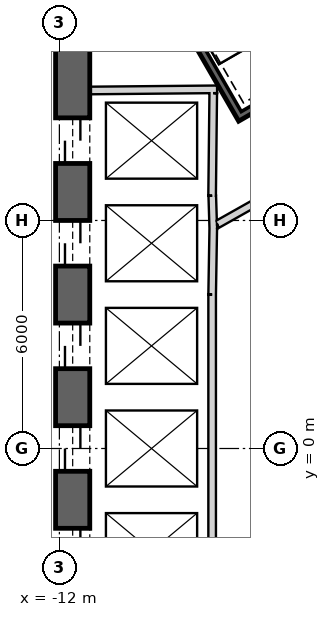
"""IFC4 building model, lengths in metres.
Left out: names, types, materials, properties, quantities, classifications, styles, units other than length and angle.
Written with IfcOpenShell. Run it as: python <this file> out.ifc"""

import sys

from ifc_helpers import new_model, si_unit, direction, frame, frame_2d, origin, place, context, subcontext, project, spatial, rectangle, extrude, element, fill, save


model = new_model("IFC4")
c1 = context("Model", 3, precision=1e-05, world=origin(), true_north=direction((0.0, 1.0)))
c2 = subcontext(c1, "Body", "Model", "MODEL_VIEW")
j1 = project(units=[si_unit("LENGTHUNIT", "METRE"), si_unit("PLANEANGLEUNIT", "RADIAN")], contexts=[c1])
p1 = place(None, origin())
s1 = spatial("IfcSite", under=j1, at=p1, CompositionType="ELEMENT")
p2 = place(p1, origin())
s2 = spatial("IfcBuilding", under=s1, at=p2, CompositionType="ELEMENT")
p3 = place(p2, frame((0.0, 0.0, 21.5)))
s3 = spatial("IfcBuildingStorey", under=s2, at=p3, CompositionType="ELEMENT", Elevation=21.5)
p4 = place(p3, frame((19.475, 2.208, 0.0), z_axis=(0.0, 0.0, 1.0), x_axis=(-0.866028369851, 0.499994862586, 0.0)))
e1 = element("IfcWall", 1, at=p4, inside=s3, PredefinedType="SHEAR", context=c2, shape_type="SweptSolid", body=[
    extrude(rectangle(XDim=31.523, YDim=0.9, at=frame_2d((15.762, 0.0))), origin(), (0.0, 0.0, 1.0), 6.0),
])
p5 = place(p4, frame((7.062, 0.0, 0.0)))
e2 = element("IfcOpeningElement", 2, at=p5, cuts=e1, PredefinedType="OPENING", context=c2, shape_type="SweptSolid", body=[
    extrude(rectangle(XDim=1.2, YDim=2.4, at=frame_2d((0.6, 1.2))), frame((0.0, 0.46, 0.0), z_axis=(0.0, -1.0, 0.0), x_axis=(1.0, 0.0, 0.0)), (0.0, 0.0, 1.0), 0.92),
])
p6 = place(p4, frame((9.762, 0.0, 0.0)))
e3 = element("IfcOpeningElement", 3, at=p6, cuts=e1, PredefinedType="OPENING", context=c2, shape_type="SweptSolid", body=[
    extrude(rectangle(XDim=1.2, YDim=2.4, at=frame_2d((0.6, 1.2))), frame((0.0, 0.46, 0.0), z_axis=(0.0, -1.0, 0.0), x_axis=(1.0, 0.0, 0.0)), (0.0, 0.0, 1.0), 0.92),
])
p7 = place(p4, frame((12.462, 0.0, 0.0)))
e4 = element("IfcOpeningElement", 4, at=p7, cuts=e1, PredefinedType="OPENING", context=c2, shape_type="SweptSolid", body=[
    extrude(rectangle(XDim=1.2, YDim=2.4, at=frame_2d((0.6, 1.2))), frame((0.0, 0.46, 0.0), z_axis=(0.0, -1.0, 0.0), x_axis=(1.0, 0.0, 0.0)), (0.0, 0.0, 1.0), 0.92),
])
p8 = place(p4, frame((15.162, 0.0, 0.0)))
e5 = element("IfcOpeningElement", 5, at=p8, cuts=e1, PredefinedType="OPENING", context=c2, shape_type="SweptSolid", body=[
    extrude(rectangle(XDim=1.2, YDim=2.4, at=frame_2d((0.6, 1.2))), frame((0.0, 0.46, 0.0), z_axis=(0.0, -1.0, 0.0), x_axis=(1.0, 0.0, 0.0)), (0.0, 0.0, 1.0), 0.92),
])
p9 = place(p4, frame((17.862, 0.0, 0.0)))
e6 = element("IfcOpeningElement", 6, at=p9, cuts=e1, PredefinedType="OPENING", context=c2, shape_type="SweptSolid", body=[
    extrude(rectangle(XDim=1.2, YDim=2.4, at=frame_2d((0.6, 1.2))), frame((0.0, 0.46, 0.0), z_axis=(0.0, -1.0, 0.0), x_axis=(1.0, 0.0, 0.0)), (0.0, 0.0, 1.0), 0.92),
])
p10 = place(p4, frame((20.562, 0.0, 0.0)))
e7 = element("IfcOpeningElement", 7, at=p10, cuts=e1, PredefinedType="OPENING", context=c2, shape_type="SweptSolid", body=[
    extrude(rectangle(XDim=1.2, YDim=2.4, at=frame_2d((0.6, 1.2))), frame((0.0, 0.46, 0.0), z_axis=(0.0, -1.0, 0.0), x_axis=(1.0, 0.0, 0.0)), (0.0, 0.0, 1.0), 0.92),
])
p11 = place(p4, frame((23.262, 0.0, 0.0)))
e8 = element("IfcOpeningElement", 8, at=p11, cuts=e1, PredefinedType="OPENING", context=c2, shape_type="SweptSolid", body=[
    extrude(rectangle(XDim=1.2, YDim=2.4, at=frame_2d((0.6, 1.2))), frame((0.0, 0.46, 0.0), z_axis=(0.0, -1.0, 0.0), x_axis=(1.0, 0.0, 0.0)), (0.0, 0.0, 1.0), 0.92),
])
p12 = place(p4, frame((3.612, 0.0, 0.0)))
e9 = element("IfcOpeningElement", 9, at=p12, cuts=e1, PredefinedType="OPENING", context=c2, shape_type="SweptSolid", body=[
    extrude(rectangle(XDim=1.2, YDim=2.4, at=frame_2d((0.6, 1.2))), frame((0.0, 0.46, 0.0), z_axis=(0.0, -1.0, 0.0), x_axis=(1.0, 0.0, 0.0)), (0.0, 0.0, 1.0), 0.92),
])
p13 = place(p4, frame((26.712, 0.0, 0.0)))
e10 = element("IfcOpeningElement", 10, at=p13, cuts=e1, PredefinedType="OPENING", context=c2, shape_type="SweptSolid", body=[
    extrude(rectangle(XDim=1.2, YDim=2.4, at=frame_2d((0.6, 1.2))), frame((0.0, 0.46, 0.0), z_axis=(0.0, -1.0, 0.0), x_axis=(1.0, 0.0, 0.0)), (0.0, 0.0, 1.0), 0.92),
])
p14 = place(p3, frame((-11.65, 15.762, 0.0), z_axis=(0.0, 0.0, 1.0), x_axis=(0.0, -1.0, 0.0)))
e11 = element("IfcWall", 11, at=p14, inside=s3, PredefinedType="SHEAR", context=c2, shape_type="SweptSolid", body=[
    extrude(rectangle(XDim=31.523, YDim=0.9, at=frame_2d((15.762, 0.0))), origin(), (0.0, 0.0, 1.0), 6.0),
])
p15 = place(p14, frame((7.062, 0.0, 0.0)))
e12 = element("IfcOpeningElement", 12, at=p15, cuts=e11, PredefinedType="OPENING", context=c2, shape_type="SweptSolid", body=[
    extrude(rectangle(XDim=1.2, YDim=2.4, at=frame_2d((0.6, 1.2))), frame((0.0, 0.46, 0.0), z_axis=(0.0, -1.0, 0.0), x_axis=(1.0, 0.0, 0.0)), (0.0, 0.0, 1.0), 0.92),
])
p16 = place(p14, frame((9.762, 0.0, 0.0)))
e13 = element("IfcOpeningElement", 13, at=p16, cuts=e11, PredefinedType="OPENING", context=c2, shape_type="SweptSolid", body=[
    extrude(rectangle(XDim=1.2, YDim=2.4, at=frame_2d((0.6, 1.2))), frame((0.0, 0.46, 0.0), z_axis=(0.0, -1.0, 0.0), x_axis=(1.0, 0.0, 0.0)), (0.0, 0.0, 1.0), 0.92),
])
p17 = place(p14, frame((12.462, 0.0, 0.0)))
e14 = element("IfcOpeningElement", 14, at=p17, cuts=e11, PredefinedType="OPENING", context=c2, shape_type="SweptSolid", body=[
    extrude(rectangle(XDim=1.2, YDim=2.4, at=frame_2d((0.6, 1.2))), frame((0.0, 0.46, 0.0), z_axis=(0.0, -1.0, 0.0), x_axis=(1.0, 0.0, 0.0)), (0.0, 0.0, 1.0), 0.92),
])
p18 = place(p14, frame((15.162, 0.0, 0.0)))
e15 = element("IfcOpeningElement", 15, at=p18, cuts=e11, PredefinedType="OPENING", context=c2, shape_type="SweptSolid", body=[
    extrude(rectangle(XDim=1.2, YDim=2.4, at=frame_2d((0.6, 1.2))), frame((0.0, 0.46, 0.0), z_axis=(0.0, -1.0, 0.0), x_axis=(1.0, 0.0, 0.0)), (0.0, 0.0, 1.0), 0.92),
])
p19 = place(p14, frame((17.862, 0.0, 0.0)))
e16 = element("IfcOpeningElement", 16, at=p19, cuts=e11, PredefinedType="OPENING", context=c2, shape_type="SweptSolid", body=[
    extrude(rectangle(XDim=1.2, YDim=2.4, at=frame_2d((0.6, 1.2))), frame((0.0, 0.46, 0.0), z_axis=(0.0, -1.0, 0.0), x_axis=(1.0, 0.0, 0.0)), (0.0, 0.0, 1.0), 0.92),
])
p20 = place(p14, frame((20.562, 0.0, 0.0)))
e17 = element("IfcOpeningElement", 17, at=p20, cuts=e11, PredefinedType="OPENING", context=c2, shape_type="SweptSolid", body=[
    extrude(rectangle(XDim=1.2, YDim=2.4, at=frame_2d((0.6, 1.2))), frame((0.0, 0.46, 0.0), z_axis=(0.0, -1.0, 0.0), x_axis=(1.0, 0.0, 0.0)), (0.0, 0.0, 1.0), 0.92),
])
p21 = place(p14, frame((23.262, 0.0, 0.0)))
e18 = element("IfcOpeningElement", 18, at=p21, cuts=e11, PredefinedType="OPENING", context=c2, shape_type="SweptSolid", body=[
    extrude(rectangle(XDim=1.2, YDim=2.4, at=frame_2d((0.6, 1.2))), frame((0.0, 0.46, 0.0), z_axis=(0.0, -1.0, 0.0), x_axis=(1.0, 0.0, 0.0)), (0.0, 0.0, 1.0), 0.92),
])
p22 = place(p14, frame((3.612, 0.0, 0.0)))
e19 = element("IfcOpeningElement", 19, at=p22, cuts=e11, PredefinedType="OPENING", context=c2, shape_type="SweptSolid", body=[
    extrude(rectangle(XDim=1.2, YDim=2.4, at=frame_2d((0.6, 1.2))), frame((0.0, 0.46, 0.0), z_axis=(0.0, -1.0, 0.0), x_axis=(1.0, 0.0, 0.0)), (0.0, 0.0, 1.0), 0.92),
])
p23 = place(p14, frame((26.712, 0.0, 0.0)))
e20 = element("IfcOpeningElement", 20, at=p23, cuts=e11, PredefinedType="OPENING", context=c2, shape_type="SweptSolid", body=[
    extrude(rectangle(XDim=1.2, YDim=2.4, at=frame_2d((0.6, 1.2))), frame((0.0, 0.46, 0.0), z_axis=(0.0, -1.0, 0.0), x_axis=(1.0, 0.0, 0.0)), (0.0, 0.0, 1.0), 0.92),
])
p24 = place(p3, frame((-7.825, -17.97, 0.0), z_axis=(0.0, 0.0, 1.0), x_axis=(0.866028369851, 0.499994862586, 0.0)))
e21 = element("IfcWall", 21, at=p24, inside=s3, PredefinedType="SHEAR", context=c2, shape_type="SweptSolid", body=[
    extrude(rectangle(XDim=31.523, YDim=0.9, at=frame_2d((15.762, 0.0))), origin(), (0.0, 0.0, 1.0), 6.0),
])
p25 = place(p24, frame((7.062, 0.0, 0.0)))
e22 = element("IfcOpeningElement", 22, at=p25, cuts=e21, PredefinedType="OPENING", context=c2, shape_type="SweptSolid", body=[
    extrude(rectangle(XDim=1.2, YDim=2.4, at=frame_2d((0.6, 1.2))), frame((0.0, 0.46, 0.0), z_axis=(0.0, -1.0, 0.0), x_axis=(1.0, 0.0, 0.0)), (0.0, 0.0, 1.0), 0.92),
])
p26 = place(p24, frame((9.762, 0.0, 0.0)))
e23 = element("IfcOpeningElement", 23, at=p26, cuts=e21, PredefinedType="OPENING", context=c2, shape_type="SweptSolid", body=[
    extrude(rectangle(XDim=1.2, YDim=2.4, at=frame_2d((0.6, 1.2))), frame((0.0, 0.46, 0.0), z_axis=(0.0, -1.0, 0.0), x_axis=(1.0, 0.0, 0.0)), (0.0, 0.0, 1.0), 0.92),
])
p27 = place(p24, frame((12.462, 0.0, 0.0)))
e24 = element("IfcOpeningElement", 24, at=p27, cuts=e21, PredefinedType="OPENING", context=c2, shape_type="SweptSolid", body=[
    extrude(rectangle(XDim=1.2, YDim=2.4, at=frame_2d((0.6, 1.2))), frame((0.0, 0.46, 0.0), z_axis=(0.0, -1.0, 0.0), x_axis=(1.0, 0.0, 0.0)), (0.0, 0.0, 1.0), 0.92),
])
p28 = place(p24, frame((15.162, 0.0, 0.0)))
e25 = element("IfcOpeningElement", 25, at=p28, cuts=e21, PredefinedType="OPENING", context=c2, shape_type="SweptSolid", body=[
    extrude(rectangle(XDim=1.2, YDim=2.4, at=frame_2d((0.6, 1.2))), frame((0.0, 0.46, 0.0), z_axis=(0.0, -1.0, 0.0), x_axis=(1.0, 0.0, 0.0)), (0.0, 0.0, 1.0), 0.92),
])
p29 = place(p24, frame((17.862, 0.0, 0.0)))
e26 = element("IfcOpeningElement", 26, at=p29, cuts=e21, PredefinedType="OPENING", context=c2, shape_type="SweptSolid", body=[
    extrude(rectangle(XDim=1.2, YDim=2.4, at=frame_2d((0.6, 1.2))), frame((0.0, 0.46, 0.0), z_axis=(0.0, -1.0, 0.0), x_axis=(1.0, 0.0, 0.0)), (0.0, 0.0, 1.0), 0.92),
])
p30 = place(p24, frame((20.562, 0.0, 0.0)))
e27 = element("IfcOpeningElement", 27, at=p30, cuts=e21, PredefinedType="OPENING", context=c2, shape_type="SweptSolid", body=[
    extrude(rectangle(XDim=1.2, YDim=2.4, at=frame_2d((0.6, 1.2))), frame((0.0, 0.46, 0.0), z_axis=(0.0, -1.0, 0.0), x_axis=(1.0, 0.0, 0.0)), (0.0, 0.0, 1.0), 0.92),
])
p31 = place(p24, frame((26.712, 0.0, 0.0)))
e28 = element("IfcOpeningElement", 28, at=p31, cuts=e21, PredefinedType="OPENING", context=c2, shape_type="SweptSolid", body=[
    extrude(rectangle(XDim=1.2, YDim=2.4, at=frame_2d((0.6, 1.2))), frame((0.0, 0.46, 0.0), z_axis=(0.0, -1.0, 0.0), x_axis=(1.0, 0.0, 0.0)), (0.0, 0.0, 1.0), 0.92),
])
p32 = place(p24, frame((3.612, 0.0, 0.0)))
e29 = element("IfcOpeningElement", 29, at=p32, cuts=e21, PredefinedType="OPENING", context=c2, shape_type="SweptSolid", body=[
    extrude(rectangle(XDim=1.2, YDim=2.4, at=frame_2d((0.6, 1.2))), frame((0.0, 0.46, 0.0), z_axis=(0.0, -1.0, 0.0), x_axis=(1.0, 0.0, 0.0)), (0.0, 0.0, 1.0), 0.92),
])
p33 = place(p3, frame((-11.2, 9.42, 0.0), z_axis=(0.0, 0.0, 1.0), x_axis=(0.999957167047, 0.009255488683, 0.0)))
e30 = element("IfcWall", 30, at=p33, inside=s3, PredefinedType="PLUMBINGWALL", context=c2, shape_type="SweptSolid", body=[
    extrude(rectangle(XDim=3.35, YDim=0.2, at=frame_2d((1.675, 0.0))), origin(), (0.0, 0.0, 1.0), 5.7),
])
p34 = place(p3, frame((-7.951, 9.35, 0.0), z_axis=(0.0, 0.0, 1.0), x_axis=(-0.011120469654, -0.999938165666, 0.0)))
e31 = element("IfcWall", 31, at=p34, inside=s3, PredefinedType="PLUMBINGWALL", context=c2, shape_type="SweptSolid", body=[
    extrude(rectangle(XDim=2.7, YDim=0.2, at=frame_2d((1.35, 0.0))), origin(), (0.0, 0.0, 1.0), 5.7),
])
p35 = place(p3, frame((-7.977, 6.65, 0.0), z_axis=(0.0, 0.0, 1.0), x_axis=(0.030861509705, -0.999523670164, 0.0)))
e32 = element("IfcWall", 32, at=p35, inside=s3, PredefinedType="PLUMBINGWALL", context=c2, shape_type="SweptSolid", body=[
    extrude(rectangle(XDim=0.878, YDim=0.2, at=frame_2d((0.439, 0.0))), origin(), (0.0, 0.0, 1.0), 5.7),
])
p36 = place(p3, frame((-7.949, 5.894, 0.0), z_axis=(0.0, 0.0, 1.0), x_axis=(-0.016809909365, -0.999858703491, 0.0)))
e33 = element("IfcWall", 33, at=p36, inside=s3, PredefinedType="PLUMBINGWALL", context=c2, shape_type="SweptSolid", body=[
    extrude(rectangle(XDim=1.844, YDim=0.2, at=frame_2d((0.922, 0.0))), origin(), (0.0, 0.0, 1.0), 5.7),
])
p37 = place(p3, frame((-7.98, 4.05, 0.0), z_axis=(0.0, 0.0, 1.0), x_axis=(0.0, -1.0, 0.0)))
e34 = element("IfcWall", 34, at=p37, inside=s3, PredefinedType="PLUMBINGWALL", context=c2, shape_type="SweptSolid", body=[
    extrude(rectangle(XDim=8.1, YDim=0.2, at=frame_2d((4.05, 0.0))), origin(), (0.0, 0.0, 1.0), 5.7),
])
p38 = place(p3, frame((-11.245, 15.678, -0.3), z_axis=(0.0, 0.0, 1.0), x_axis=(0.499977274689, -0.866038523851, 0.0)))
e35 = element("IfcWall", 35, at=p38, inside=s3, PredefinedType="SHEAR", context=c2, shape_type="SweptSolid", body=[
    extrude(rectangle(XDim=8.1, YDim=0.2, at=frame_2d((4.05, 0.0))), origin(), (0.0, 0.0, 1.0), 6.0),
])
p39 = place(p3, frame((-7.159, 8.8, -0.3), z_axis=(0.0, 0.0, 1.0), x_axis=(0.866047807691, 0.499961193289, 0.0)))
e36 = element("IfcWall", 36, at=p39, inside=s3, PredefinedType="SHEAR", context=c2, shape_type="SweptSolid", body=[
    extrude(rectangle(XDim=3.6, YDim=0.2, at=frame_2d((1.8, 0.0))), origin(), (0.0, 0.0, 1.0), 6.0),
])
p40 = place(p39, frame((1.25, 0.0, 0.3)))
e37 = element("IfcOpeningElement", 37, at=p40, cuts=e36, PredefinedType="OPENING", context=c2, shape_type="SweptSolid", body=[
    extrude(rectangle(XDim=1.1, YDim=2.1, at=frame_2d((0.55, 1.05))), frame((0.0, 0.11, 0.0), z_axis=(0.0, -1.0, 0.0), x_axis=(1.0, 0.0, 0.0)), (0.0, 0.0, 1.0), 0.22),
])
p41 = place(p3, frame((-5.6, 7.16, 0.0), z_axis=(0.0, 0.0, 1.0), x_axis=(-0.871340486379, -0.490678873396, 0.0)))
e38 = element("IfcWall", 38, at=p41, inside=s3, PredefinedType="PARTITIONING", context=c2, shape_type="SweptSolid", body=[
    extrude(rectangle(XDim=2.581, YDim=0.2, at=frame_2d((1.291, 0.0))), origin(), (0.0, 0.0, 1.0), 5.7),
])
p42 = place(p15, origin())
e39 = element("IfcDoor", 39, at=p42, inside=s3, OperationType="SLIDING_TO_LEFT", PredefinedType="USERDEFINED", context=c2, shape_type="SweptSolid", body=[
    extrude(rectangle(XDim=1.2, YDim=2.4, at=frame_2d((0.6, 1.2))), frame((0.0, 0.025, 0.0), z_axis=(0.0, -1.0, 0.0), x_axis=(1.0, 0.0, 0.0)), (0.0, 0.0, 1.0), 0.05),
])
fill(e12, e39)
p43 = place(p16, origin())
e40 = element("IfcDoor", 40, at=p43, inside=s3, OperationType="SLIDING_TO_LEFT", PredefinedType="USERDEFINED", context=c2, shape_type="SweptSolid", body=[
    extrude(rectangle(XDim=1.2, YDim=2.4, at=frame_2d((0.6, 1.2))), frame((0.0, 0.025, 0.0), z_axis=(0.0, -1.0, 0.0), x_axis=(1.0, 0.0, 0.0)), (0.0, 0.0, 1.0), 0.05),
])
fill(e13, e40)
p44 = place(p17, origin())
e41 = element("IfcDoor", 41, at=p44, inside=s3, OperationType="SLIDING_TO_LEFT", PredefinedType="USERDEFINED", context=c2, shape_type="SweptSolid", body=[
    extrude(rectangle(XDim=1.2, YDim=2.4, at=frame_2d((0.6, 1.2))), frame((0.0, 0.025, 0.0), z_axis=(0.0, -1.0, 0.0), x_axis=(1.0, 0.0, 0.0)), (0.0, 0.0, 1.0), 0.05),
])
fill(e14, e41)
p45 = place(p18, origin())
e42 = element("IfcDoor", 42, at=p45, inside=s3, OperationType="SLIDING_TO_LEFT", PredefinedType="USERDEFINED", context=c2, shape_type="SweptSolid", body=[
    extrude(rectangle(XDim=1.2, YDim=2.4, at=frame_2d((0.6, 1.2))), frame((0.0, 0.025, 0.0), z_axis=(0.0, -1.0, 0.0), x_axis=(1.0, 0.0, 0.0)), (0.0, 0.0, 1.0), 0.05),
])
fill(e15, e42)
p46 = place(p19, origin())
e43 = element("IfcDoor", 43, at=p46, inside=s3, OperationType="SLIDING_TO_LEFT", PredefinedType="USERDEFINED", context=c2, shape_type="SweptSolid", body=[
    extrude(rectangle(XDim=1.2, YDim=2.4, at=frame_2d((0.6, 1.2))), frame((0.0, 0.025, 0.0), z_axis=(0.0, -1.0, 0.0), x_axis=(1.0, 0.0, 0.0)), (0.0, 0.0, 1.0), 0.05),
])
fill(e16, e43)
save(model, sys.argv[1])
